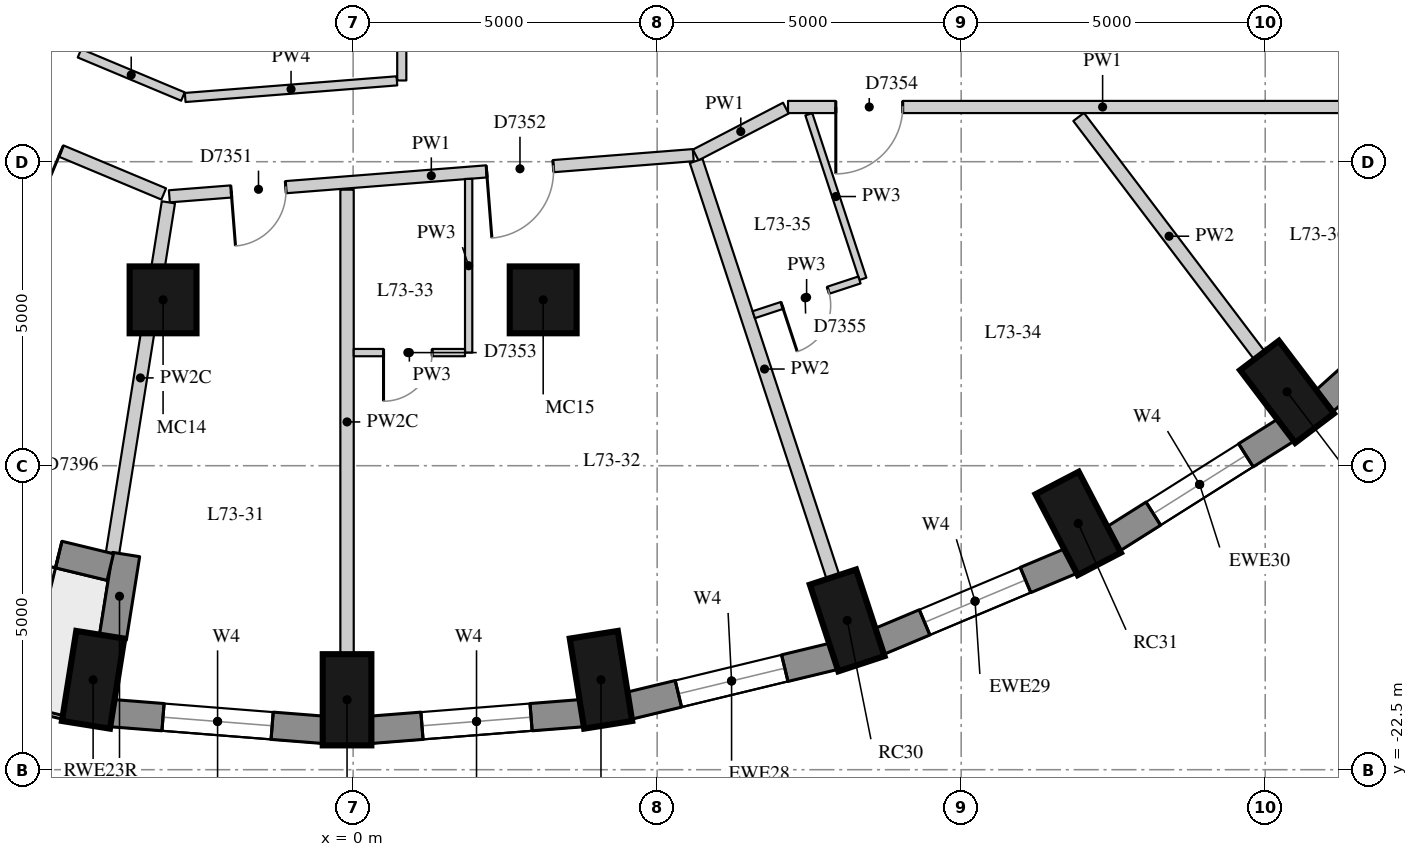
"""IFC4 building model, lengths in metres.
Left out: names, types, materials, properties, quantities, classifications, styles, units other than length and angle.
Written with IfcOpenShell. Run it as: python <this file> out.ifc"""

import sys

from ifc_helpers import new_model, si_unit, direction, frame, frame_2d, origin, origin_2d, place, context, subcontext, project, spatial, rectangle, extrude, element, fill, save


model = new_model("IFC4")
c1 = context("Model", 3, precision=1e-05, world=origin(), true_north=direction((0.0, 1.0)))
c2 = subcontext(c1, "Body", "Model", "MODEL_VIEW")
j1 = project(units=[si_unit("LENGTHUNIT", "METRE"), si_unit("PLANEANGLEUNIT", "RADIAN")], contexts=[c1])
p1 = place(None, origin())
s1 = spatial("IfcSite", under=j1, at=p1, CompositionType="ELEMENT")
p2 = place(p1, origin())
s2 = spatial("IfcBuilding", under=s1, at=p2, CompositionType="ELEMENT")
p3 = place(p2, frame((0.0, 0.0, 256.4)))
s3 = spatial("IfcBuildingStorey", under=s2, at=p3, CompositionType="ELEMENT", Elevation=256.4)
for number, where, z_axis, x_axis in (
    (1, (-4.276, -21.021, 0.0), (0.0, 0.0, 1.0), (-0.157, -0.988, 0.0)),
    (2, (-0.1, -21.35, 0.0), (0.0, 0.0, 1.0), (0.0, -1.0, 0.0)),
    (3, (4.076, -21.021, 0.0), (0.0, 0.0, 1.0), (0.157, -0.988, 0.0)),
    (4, (8.125, -20.044, 0.0), (0.0, 0.0, 1.0), (0.312, -0.95, 0.0)),
    (5, (11.925, -18.449, 0.0), (0.0, 0.0, 1.0), (0.462, -0.887, 0.0)),
    (6, (15.359, -16.285, 0.0), (0.0, 0.0, 1.0), (0.604, -0.797, 0.0)),
):
    element("IfcColumn", number, at=place(p3, frame(where, z_axis=z_axis, x_axis=x_axis)), inside=s3, PredefinedType="COLUMN", context=c2, shape_type="SweptSolid", body=[
        extrude(rectangle(XDim=1.5, YDim=0.8, at=origin_2d()), origin(), (0.0, 0.0, 1.0), 3.3),
    ])
for number, where, z_axis, x_axis in (
    (7, (-3.126, -14.772, 0.0), (0.0, 0.0, 1.0), (1.0, 0.0, 0.0)),
    (8, (3.126, -14.772, 0.0), (0.0, 0.0, 1.0), (1.0, 0.0, 0.0)),
):
    element("IfcColumn", number, at=place(p3, frame(where, z_axis=z_axis, x_axis=x_axis)), inside=s3, PredefinedType="COLUMN", context=c2, shape_type="SweptSolid", body=[
        extrude(rectangle(XDim=1.1, YDim=1.1, at=origin_2d()), origin(), (0.0, 0.0, 1.0), 3.3),
    ])
p4 = place(p3, frame((-3.979, -21.569, 0.0), z_axis=(0.0, 0.0, 1.0), x_axis=(0.996910775835, -0.078542377245, 0.0)))
e9 = element("IfcWall", 9, at=p4, inside=s3, PredefinedType="SOLIDWALL", context=c2, shape_type="SweptSolid", body=[
    extrude(rectangle(XDim=3.509, YDim=0.45, at=frame_2d((1.755, 0.0))), origin(), (0.0, 0.0, 1.0), 2.95),
])
p5 = place(p4, frame((0.855, 0.0, 0.4)))
e10 = element("IfcOpeningElement", 10, at=p5, cuts=e9, PredefinedType="OPENING", context=c2, shape_type="SweptSolid", body=[
    extrude(rectangle(XDim=1.8, YDim=1.75, at=frame_2d((0.9, 0.875))), frame((0.0, 0.235, 0.0), z_axis=(0.0, -1.0, 0.0), x_axis=(1.0, 0.0, 0.0)), (0.0, 0.0, 1.0), 0.47),
])
p6 = place(p3, frame((0.28, -21.844, 0.0), z_axis=(0.0, 0.0, 1.0), x_axis=(0.996910775835, 0.078542377245, 0.0)))
e11 = element("IfcWall", 11, at=p6, inside=s3, PredefinedType="SOLIDWALL", context=c2, shape_type="SweptSolid", body=[
    extrude(rectangle(XDim=3.509, YDim=0.45, at=frame_2d((1.755, 0.0))), origin(), (0.0, 0.0, 1.0), 2.95),
])
p7 = place(p6, frame((0.855, 0.0, 0.4)))
e12 = element("IfcOpeningElement", 12, at=p7, cuts=e11, PredefinedType="OPENING", context=c2, shape_type="SweptSolid", body=[
    extrude(rectangle(XDim=1.8, YDim=1.75, at=frame_2d((0.9, 0.875))), frame((0.0, 0.235, 0.0), z_axis=(0.0, -1.0, 0.0), x_axis=(1.0, 0.0, 0.0)), (0.0, 0.0, 1.0), 0.47),
])
p8 = place(p3, frame((4.529, -21.449, 0.0), z_axis=(0.0, 0.0, 1.0), x_axis=(0.972115243017, 0.234503633859, 0.0)))
e13 = element("IfcWall", 13, at=p8, inside=s3, PredefinedType="SOLIDWALL", context=c2, shape_type="SweptSolid", body=[
    extrude(rectangle(XDim=3.487, YDim=0.45, at=frame_2d((1.743, 0.0))), origin(), (0.0, 0.0, 1.0), 2.95),
])
p9 = place(p8, frame((0.843, 0.0, 0.4)))
e14 = element("IfcOpeningElement", 14, at=p9, cuts=e13, PredefinedType="OPENING", context=c2, shape_type="SweptSolid", body=[
    extrude(rectangle(XDim=1.8, YDim=1.75, at=frame_2d((0.9, 0.875))), frame((0.0, 0.235, 0.0), z_axis=(0.0, -1.0, 0.0), x_axis=(1.0, 0.0, 0.0)), (0.0, 0.0, 1.0), 0.47),
])
p10 = place(p3, frame((8.641, -20.395, 0.0), z_axis=(0.0, 0.0, 1.0), x_axis=(0.922049934692, 0.3870709469, 0.0)))
e15 = element("IfcWall", 15, at=p10, inside=s3, PredefinedType="SOLIDWALL", context=c2, shape_type="SweptSolid", body=[
    extrude(rectangle(XDim=3.443, YDim=0.45, at=frame_2d((1.722, 0.0))), origin(), (0.0, 0.0, 1.0), 2.95),
])
p11 = place(p10, frame((0.822, 0.0, 0.4)))
e16 = element("IfcOpeningElement", 16, at=p11, cuts=e15, PredefinedType="OPENING", context=c2, shape_type="SweptSolid", body=[
    extrude(rectangle(XDim=1.8, YDim=1.75, at=frame_2d((0.9, 0.875))), frame((0.0, 0.235, 0.0), z_axis=(0.0, -1.0, 0.0), x_axis=(1.0, 0.0, 0.0)), (0.0, 0.0, 1.0), 0.47),
])
p12 = place(p3, frame((12.49, -18.711, 0.0), z_axis=(0.0, 0.0, 1.0), x_axis=(0.845929139811, 0.53329531258, 0.0)))
e17 = element("IfcWall", 17, at=p12, inside=s3, PredefinedType="SOLIDWALL", context=c2, shape_type="SweptSolid", body=[
    extrude(rectangle(XDim=3.385, YDim=0.45, at=frame_2d((1.692, 0.0))), origin(), (0.0, 0.0, 1.0), 2.95),
])
p13 = place(p12, frame((0.792, 0.0, 0.4)))
e18 = element("IfcOpeningElement", 18, at=p13, cuts=e17, PredefinedType="OPENING", context=c2, shape_type="SweptSolid", body=[
    extrude(rectangle(XDim=1.8, YDim=1.75, at=frame_2d((0.9, 0.875))), frame((0.0, 0.235, 0.0), z_axis=(0.0, -1.0, 0.0), x_axis=(1.0, 0.0, 0.0)), (0.0, 0.0, 1.0), 0.47),
])
p14 = place(p3, frame((15.959, -16.448, 0.0), z_axis=(0.0, 0.0, 1.0), x_axis=(0.743166014219, 0.669107073128, 0.0)))
e19 = element("IfcWall", 19, at=p14, inside=s3, PredefinedType="SOLIDWALL", context=c2, shape_type="SweptSolid", body=[
    extrude(rectangle(XDim=3.316, YDim=0.45, at=frame_2d((1.658, 0.0))), origin(), (0.0, 0.0, 1.0), 2.95),
])
p15 = place(p3, frame((-3.951, -20.333, 0.0), z_axis=(0.0, 0.0, 1.0), x_axis=(0.157189016474, 0.9875685359, 0.0)))
e20 = element("IfcWall", 20, at=p15, inside=s3, PredefinedType="SOLIDWALL", context=c2, shape_type="SweptSolid", body=[
    extrude(rectangle(XDim=1.39, YDim=0.45, at=frame_2d((0.695, 0.0))), origin(), (0.0, 0.0, 1.0), 2.5),
])
p16 = place(p3, frame((-7.78, -18.25, 0.0), z_axis=(0.0, 0.0, 1.0), x_axis=(0.971943523304, -0.235214343755, 0.0)))
e21 = element("IfcWall", 21, at=p16, inside=s3, PredefinedType="SOLIDWALL", context=c2, shape_type="SweptSolid", body=[
    extrude(rectangle(XDim=3.896, YDim=0.45, at=frame_2d((1.948, 0.0))), origin(), (0.0, 0.0, 1.0), 2.95),
])
p17 = place(p16, frame((0.873, 0.0, 0.4)))
e22 = element("IfcOpeningElement", 22, at=p17, cuts=e21, PredefinedType="OPENING", context=c2, shape_type="SweptSolid", body=[
    extrude(rectangle(XDim=1.0, YDim=1.75, at=frame_2d((0.5, 0.875))), frame((0.0, 0.235, 0.0), z_axis=(0.0, -1.0, 0.0), x_axis=(1.0, 0.0, 0.0)), (0.0, 0.0, 1.0), 0.47),
])
p18 = place(p16, frame((2.023, 0.0, 0.0)))
e23 = element("IfcOpeningElement", 23, at=p18, cuts=e21, PredefinedType="OPENING", context=c2, shape_type="SweptSolid", body=[
    extrude(rectangle(XDim=1.0, YDim=2.15, at=frame_2d((0.5, 1.075))), frame((0.0, 0.235, 0.0), z_axis=(0.0, -1.0, 0.0), x_axis=(1.0, 0.0, 0.0)), (0.0, 0.0, 1.0), 0.47),
])
p19 = place(p3, frame((17.5, -11.6, 0.0), z_axis=(0.0, 0.0, 1.0), x_axis=(-1.0, 0.0, 0.0)))
e24 = element("IfcWall", 24, at=p19, inside=s3, PredefinedType="PARTITIONING", context=c2, shape_type="SweptSolid", body=[
    extrude(rectangle(XDim=10.348, YDim=0.2, at=frame_2d((5.174, 0.0))), origin(), (0.0, 0.0, 1.0), 2.95),
])
p20 = place(p19, frame((8.462, 0.0, 0.0)))
e25 = element("IfcOpeningElement", 25, at=p20, cuts=e24, PredefinedType="OPENING", context=c2, shape_type="SweptSolid", body=[
    extrude(rectangle(XDim=1.1, YDim=2.1, at=frame_2d((0.55, 1.05))), frame((0.0, 0.11, 0.0), z_axis=(0.0, -1.0, 0.0), x_axis=(1.0, 0.0, 0.0)), (0.0, 0.0, 1.0), 0.22),
])
p21 = place(p3, frame((7.116, -11.619, 0.0), z_axis=(0.0, 0.0, 1.0), x_axis=(-0.88733399288, -0.461127298128, 0.0)))
e26 = element("IfcWall", 26, at=p21, inside=s3, PredefinedType="PARTITIONING", context=c2, shape_type="SweptSolid", body=[
    extrude(rectangle(XDim=1.671, YDim=0.2, at=frame_2d((0.835, 0.0))), origin(), (0.0, 0.0, 1.0), 2.95),
])
p22 = place(p3, frame((5.594, -12.392, 0.0), z_axis=(0.0, 0.0, 1.0), x_axis=(-0.996925151721, -0.078359695423, 0.0)))
e27 = element("IfcWall", 27, at=p22, inside=s3, PredefinedType="PARTITIONING", context=c2, shape_type="SweptSolid", body=[
    extrude(rectangle(XDim=8.643, YDim=0.2, at=frame_2d((4.321, 0.0))), origin(), (0.0, 0.0, 1.0), 2.95),
])
p23 = place(p22, frame((6.722, 0.0, 0.0)))
e28 = element("IfcOpeningElement", 28, at=p23, cuts=e27, PredefinedType="OPENING", context=c2, shape_type="SweptSolid", body=[
    extrude(rectangle(XDim=0.9, YDim=2.1, at=frame_2d((0.45, 1.05))), frame((0.0, 0.11, 0.0), z_axis=(0.0, -1.0, 0.0), x_axis=(1.0, 0.0, 0.0)), (0.0, 0.0, 1.0), 0.22),
])
p24 = place(p22, frame((2.309, 0.0, 0.0)))
e29 = element("IfcOpeningElement", 29, at=p24, cuts=e27, PredefinedType="OPENING", context=c2, shape_type="SweptSolid", body=[
    extrude(rectangle(XDim=1.1, YDim=2.1, at=frame_2d((0.55, 1.05))), frame((0.0, 0.11, 0.0), z_axis=(0.0, -1.0, 0.0), x_axis=(1.0, 0.0, 0.0)), (0.0, 0.0, 1.0), 0.22),
])
p25 = place(p3, frame((-3.115, -13.03, 0.0), z_axis=(0.0, 0.0, 1.0), x_axis=(-0.922510557065, 0.385971854031, 0.0)))
e30 = element("IfcWall", 30, at=p25, inside=s3, PredefinedType="PARTITIONING", context=c2, shape_type="SweptSolid", body=[
    extrude(rectangle(XDim=4.97, YDim=0.2, at=frame_2d((2.485, 0.0))), origin(), (0.0, 0.0, 1.0), 2.95),
])
p26 = place(p25, frame((1.829, 0.0, 0.0)))
e31 = element("IfcOpeningElement", 31, at=p26, cuts=e30, PredefinedType="OPENING", context=c2, shape_type="SweptSolid", body=[
    extrude(rectangle(XDim=1.1, YDim=2.1, at=frame_2d((0.55, 1.05))), frame((0.0, 0.11, 0.0), z_axis=(0.0, -1.0, 0.0), x_axis=(1.0, 0.0, 0.0)), (0.0, 0.0, 1.0), 0.22),
])
p27 = place(p3, frame((0.8, -9.23, 0.0), z_axis=(0.0, 0.0, 1.0), x_axis=(0.0, -1.0, 0.0)))
e32 = element("IfcWall", 32, at=p27, inside=s3, PredefinedType="PARTITIONING", context=c2, shape_type="SweptSolid", body=[
    extrude(rectangle(XDim=1.934, YDim=0.15, at=frame_2d((0.967, 0.0))), origin(), (0.0, 0.0, 1.0), 2.95),
])
p28 = place(p3, frame((0.72, -11.17, 0.0), z_axis=(0.0, 0.0, 1.0), x_axis=(-0.996919759383, -0.078428268828, 0.0)))
e33 = element("IfcWall", 33, at=p28, inside=s3, PredefinedType="PARTITIONING", context=c2, shape_type="SweptSolid", body=[
    extrude(rectangle(XDim=3.493, YDim=0.15, at=frame_2d((1.746, 0.0))), origin(), (0.0, 0.0, 1.0), 2.95),
])
p29 = place(p3, frame((-2.799, -11.428, 0.0), z_axis=(0.0, 0.0, 1.0), x_axis=(-0.922507880735, 0.385978250659, 0.0)))
e34 = element("IfcWall", 34, at=p29, inside=s3, PredefinedType="PARTITIONING", context=c2, shape_type="SweptSolid", body=[
    extrude(rectangle(XDim=1.844, YDim=0.15, at=frame_2d((0.922, 0.0))), origin(), (0.0, 0.0, 1.0), 2.95),
])
p30 = place(p3, frame((-3.958, -18.944, 0.0), z_axis=(0.0, 0.0, 1.0), x_axis=(0.157252920937, 0.987558362253, 0.0)))
e35 = element("IfcWall", 35, at=p30, inside=s3, PredefinedType="PARTITIONING", context=c2, shape_type="SweptSolid", body=[
    extrude(rectangle(XDim=5.848, YDim=0.22, at=frame_2d((2.924, 0.0))), origin(), (0.0, 0.0, 1.0), 2.5),
])
p31 = place(p3, frame((-0.1, -20.6, 0.0), z_axis=(0.0, 0.0, 1.0), x_axis=(0.0, 1.0, 0.0)))
e36 = element("IfcWall", 36, at=p31, inside=s3, PredefinedType="PARTITIONING", context=c2, shape_type="SweptSolid", body=[
    extrude(rectangle(XDim=7.64, YDim=0.22, at=frame_2d((3.82, 0.0))), origin(), (0.0, 0.0, 1.0), 2.5),
])
p32 = place(p3, frame((7.891, -19.332, 0.0), z_axis=(0.0, 0.0, 1.0), x_axis=(-0.31230054546, 0.94998335212, 0.0)))
e37 = element("IfcWall", 37, at=p32, inside=s3, PredefinedType="PARTITIONING", context=c2, shape_type="SweptSolid", body=[
    extrude(rectangle(XDim=7.204, YDim=0.22, at=frame_2d((3.602, 0.0))), origin(), (0.0, 0.0, 1.0), 2.95),
])
p33 = place(p3, frame((14.906, -15.687, 0.0), z_axis=(0.0, 0.0, 1.0), x_axis=(-0.604078206052, 0.796925041, 0.0)))
e38 = element("IfcWall", 38, at=p33, inside=s3, PredefinedType="PARTITIONING", context=c2, shape_type="SweptSolid", body=[
    extrude(rectangle(XDim=4.923, YDim=0.22, at=frame_2d((2.462, 0.0))), origin(), (0.0, 0.0, 1.0), 2.95),
])
p34 = place(p3, frame((1.9, -12.783, 0.0), z_axis=(0.0, 0.0, 1.0), x_axis=(0.0, -1.0, 0.0)))
e39 = element("IfcWall", 39, at=p34, inside=s3, PredefinedType="PARTITIONING", context=c2, shape_type="SweptSolid", body=[
    extrude(rectangle(XDim=2.857, YDim=0.12, at=frame_2d((1.428, 0.0))), origin(), (0.0, 0.0, 1.0), 2.95),
])
p35 = place(p3, frame((7.494, -11.719, 0.0), z_axis=(0.0, 0.0, 1.0), x_axis=(0.312267061004, -0.949994359253, 0.0)))
e40 = element("IfcWall", 40, at=p35, inside=s3, PredefinedType="PARTITIONING", context=c2, shape_type="SweptSolid", body=[
    extrude(rectangle(XDim=2.85, YDim=0.12, at=frame_2d((1.425, 0.0))), origin(), (0.0, 0.0, 1.0), 2.95),
])
p36 = place(p3, frame((1.84, -15.64, 0.0), z_axis=(0.0, 0.0, 1.0), x_axis=(-1.0, 0.0, 0.0)))
e41 = element("IfcWall", 41, at=p36, inside=s3, PredefinedType="PARTITIONING", context=c2, shape_type="SweptSolid", body=[
    extrude(rectangle(XDim=1.83, YDim=0.12, at=frame_2d((0.915, 0.0))), origin(), (0.0, 0.0, 1.0), 2.95),
])
p37 = place(p36, frame((0.54, 0.0, 0.0)))
e42 = element("IfcOpeningElement", 42, at=p37, cuts=e41, PredefinedType="OPENING", context=c2, shape_type="SweptSolid", body=[
    extrude(rectangle(XDim=0.8, YDim=2.1, at=frame_2d((0.4, 1.05))), frame((0.0, 0.07, 0.0), z_axis=(0.0, -1.0, 0.0), x_axis=(1.0, 0.0, 0.0)), (0.0, 0.0, 1.0), 0.14),
])
p38 = place(p3, frame((8.327, -14.445, 0.0), z_axis=(0.0, 0.0, 1.0), x_axis=(-0.950022140222, -0.312182531684, 0.0)))
e43 = element("IfcWall", 43, at=p38, inside=s3, PredefinedType="PARTITIONING", context=c2, shape_type="SweptSolid", body=[
    extrude(rectangle(XDim=1.83, YDim=0.12, at=frame_2d((0.915, 0.0))), origin(), (0.0, 0.0, 1.0), 2.95),
])
p39 = place(p38, frame((0.54, 0.0, 0.0)))
e44 = element("IfcOpeningElement", 44, at=p39, cuts=e43, PredefinedType="OPENING", context=c2, shape_type="SweptSolid", body=[
    extrude(rectangle(XDim=0.8, YDim=2.1, at=frame_2d((0.4, 1.05))), frame((0.0, 0.07, 0.0), z_axis=(0.0, -1.0, 0.0), x_axis=(1.0, 0.0, 0.0)), (0.0, 0.0, 1.0), 0.14),
])
p40 = place(p5, origin())
e45 = element("IfcWindow", 45, at=p40, inside=s3, PartitioningType="SINGLE_PANEL", PredefinedType="WINDOW", context=c2, shape_type="SweptSolid", body=[
    extrude(rectangle(XDim=1.8, YDim=1.75, at=frame_2d((0.9, 0.875))), frame((0.0, 0.035, 0.0), z_axis=(0.0, -1.0, 0.0), x_axis=(1.0, 0.0, 0.0)), (0.0, 0.0, 1.0), 0.06),
])
fill(e10, e45)
p41 = place(p7, origin())
e46 = element("IfcWindow", 46, at=p41, inside=s3, PartitioningType="SINGLE_PANEL", PredefinedType="WINDOW", context=c2, shape_type="SweptSolid", body=[
    extrude(rectangle(XDim=1.8, YDim=1.75, at=frame_2d((0.9, 0.875))), frame((0.0, 0.035, 0.0), z_axis=(0.0, -1.0, 0.0), x_axis=(1.0, 0.0, 0.0)), (0.0, 0.0, 1.0), 0.06),
])
fill(e12, e46)
p42 = place(p9, origin())
e47 = element("IfcWindow", 47, at=p42, inside=s3, PartitioningType="SINGLE_PANEL", PredefinedType="WINDOW", context=c2, shape_type="SweptSolid", body=[
    extrude(rectangle(XDim=1.8, YDim=1.75, at=frame_2d((0.9, 0.875))), frame((0.0, 0.035, 0.0), z_axis=(0.0, -1.0, 0.0), x_axis=(1.0, 0.0, 0.0)), (0.0, 0.0, 1.0), 0.06),
])
fill(e14, e47)
p43 = place(p11, origin())
e48 = element("IfcWindow", 48, at=p43, inside=s3, PartitioningType="SINGLE_PANEL", PredefinedType="WINDOW", context=c2, shape_type="SweptSolid", body=[
    extrude(rectangle(XDim=1.8, YDim=1.75, at=frame_2d((0.9, 0.875))), frame((0.0, 0.035, 0.0), z_axis=(0.0, -1.0, 0.0), x_axis=(1.0, 0.0, 0.0)), (0.0, 0.0, 1.0), 0.06),
])
fill(e16, e48)
p44 = place(p13, origin())
e49 = element("IfcWindow", 49, at=p44, inside=s3, PartitioningType="SINGLE_PANEL", PredefinedType="WINDOW", context=c2, shape_type="SweptSolid", body=[
    extrude(rectangle(XDim=1.8, YDim=1.75, at=frame_2d((0.9, 0.875))), frame((0.0, 0.035, 0.0), z_axis=(0.0, -1.0, 0.0), x_axis=(1.0, 0.0, 0.0)), (0.0, 0.0, 1.0), 0.06),
])
fill(e18, e49)
p45 = place(p18, frame((1.0, 0.0, 0.0), z_axis=(0.0, 0.0, 1.0), x_axis=(-1.0, 0.0, 0.0)))
e50 = element("IfcDoor", 50, at=p45, inside=s3, OperationType="SINGLE_SWING_LEFT", PredefinedType="DOOR", context=c2, shape_type="SweptSolid", body=[
    extrude(rectangle(XDim=1.0, YDim=2.15, at=frame_2d((0.5, 1.075))), frame((0.0, 0.075, 0.0), z_axis=(0.0, -1.0, 0.0), x_axis=(1.0, 0.0, 0.0)), (0.0, 0.0, 1.0), 0.05),
])
fill(e23, e50)
p46 = place(p26, origin())
e51 = element("IfcDoor", 51, at=p46, inside=s3, OperationType="SINGLE_SWING_LEFT", PredefinedType="DOOR", context=c2, shape_type="SweptSolid", body=[
    extrude(rectangle(XDim=1.1, YDim=2.1, at=frame_2d((0.55, 1.05))), frame((0.0, 0.025, 0.0), z_axis=(0.0, -1.0, 0.0), x_axis=(1.0, 0.0, 0.0)), (0.0, 0.0, 1.0), 0.05),
])
fill(e31, e51)
p47 = place(p23, origin())
e52 = element("IfcDoor", 52, at=p47, inside=s3, OperationType="SINGLE_SWING_RIGHT", PredefinedType="DOOR", context=c2, shape_type="SweptSolid", body=[
    extrude(rectangle(XDim=0.9, YDim=2.1, at=frame_2d((0.45, 1.05))), frame((0.0, 0.025, 0.0), z_axis=(0.0, -1.0, 0.0), x_axis=(1.0, 0.0, 0.0)), (0.0, 0.0, 1.0), 0.05),
])
fill(e28, e52)
p48 = place(p24, origin())
e53 = element("IfcDoor", 53, at=p48, inside=s3, OperationType="SINGLE_SWING_RIGHT", PredefinedType="DOOR", context=c2, shape_type="SweptSolid", body=[
    extrude(rectangle(XDim=1.1, YDim=2.1, at=frame_2d((0.55, 1.05))), frame((0.0, 0.025, 0.0), z_axis=(0.0, -1.0, 0.0), x_axis=(1.0, 0.0, 0.0)), (0.0, 0.0, 1.0), 0.05),
])
fill(e29, e53)
p49 = place(p37, origin())
e54 = element("IfcDoor", 54, at=p49, inside=s3, OperationType="SINGLE_SWING_RIGHT", PredefinedType="DOOR", context=c2, shape_type="SweptSolid", body=[
    extrude(rectangle(XDim=0.8, YDim=2.1, at=frame_2d((0.4, 1.05))), frame((0.0, 0.025, 0.0), z_axis=(0.0, -1.0, 0.0), x_axis=(1.0, 0.0, 0.0)), (0.0, 0.0, 1.0), 0.05),
])
fill(e42, e54)
p50 = place(p20, origin())
e55 = element("IfcDoor", 55, at=p50, inside=s3, OperationType="SINGLE_SWING_RIGHT", PredefinedType="DOOR", context=c2, shape_type="SweptSolid", body=[
    extrude(rectangle(XDim=1.1, YDim=2.1, at=frame_2d((0.55, 1.05))), frame((0.0, 0.025, 0.0), z_axis=(0.0, -1.0, 0.0), x_axis=(1.0, 0.0, 0.0)), (0.0, 0.0, 1.0), 0.05),
])
fill(e25, e55)
p51 = place(p39, origin())
e56 = element("IfcDoor", 56, at=p51, inside=s3, OperationType="SINGLE_SWING_RIGHT", PredefinedType="DOOR", context=c2, shape_type="SweptSolid", body=[
    extrude(rectangle(XDim=0.8, YDim=2.1, at=frame_2d((0.4, 1.05))), frame((0.0, 0.025, 0.0), z_axis=(0.0, -1.0, 0.0), x_axis=(1.0, 0.0, 0.0)), (0.0, 0.0, 1.0), 0.05),
])
fill(e44, e56)
save(model, sys.argv[1])
